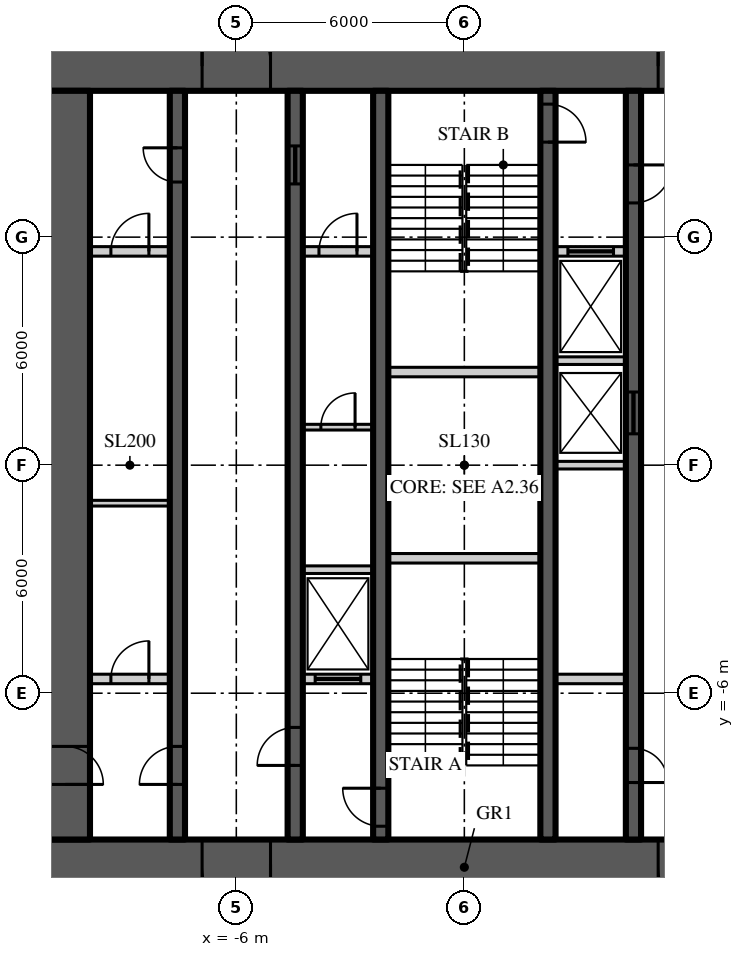
"""IFC4 building model, lengths in metres.
Left out: names, types, materials, properties, quantities, classifications, styles, units other than length and angle.
Written with IfcOpenShell. Run it as: python <this file> out.ifc"""

import sys

from ifc_helpers import new_model, si_unit, direction, frame, frame_2d, origin, place, context, subcontext, project, spatial, rectangle, extrude, element, fill, save


model = new_model("IFC4")
c1 = context("Model", 3, precision=1e-05, world=origin(), true_north=direction((0.0, 1.0)))
c2 = subcontext(c1, "Body", "Model", "MODEL_VIEW")
j1 = project(units=[si_unit("LENGTHUNIT", "METRE"), si_unit("PLANEANGLEUNIT", "RADIAN")], contexts=[c1])
p1 = place(None, origin())
s1 = spatial("IfcSite", under=j1, at=p1, CompositionType="ELEMENT")
p2 = place(p1, origin())
s2 = spatial("IfcBuilding", under=s1, at=p2, CompositionType="ELEMENT")
p3 = place(p2, frame((0.0, 0.0, 286.8)))
s3 = spatial("IfcBuildingStorey", under=s2, at=p3, CompositionType="ELEMENT", Elevation=286.8)
p4 = place(p3, frame((-11.15, 10.5, 0.0), z_axis=(0.0, 0.0, 1.0), x_axis=(1.0, 0.0, 0.0)))
e1 = element("IfcWall", 1, at=p4, inside=s3, PredefinedType="SHEAR", context=c2, shape_type="SweptSolid", body=[
    extrude(rectangle(XDim=22.3, YDim=1.3, at=frame_2d((11.15, 0.0))), origin(), (0.0, 0.0, 1.0), 3.9),
])
p5 = place(p4, frame((4.25, 0.0, 0.0)))
e2 = element("IfcOpeningElement", 2, at=p5, cuts=e1, PredefinedType="OPENING", context=c2, shape_type="SweptSolid", body=[
    extrude(rectangle(XDim=1.8, YDim=2.2, at=frame_2d((0.9, 1.1))), frame((0.0, 0.66, 0.0), z_axis=(0.0, -1.0, 0.0), x_axis=(1.0, 0.0, 0.0)), (0.0, 0.0, 1.0), 1.32),
])
p6 = place(p4, frame((16.25, 0.0, 0.0)))
e3 = element("IfcOpeningElement", 3, at=p6, cuts=e1, PredefinedType="OPENING", context=c2, shape_type="SweptSolid", body=[
    extrude(rectangle(XDim=1.8, YDim=2.2, at=frame_2d((0.9, 1.1))), frame((0.0, 0.66, 0.0), z_axis=(0.0, -1.0, 0.0), x_axis=(1.0, 0.0, 0.0)), (0.0, 0.0, 1.0), 1.32),
])
p7 = place(p3, frame((11.15, -10.5, 0.0), z_axis=(0.0, 0.0, 1.0), x_axis=(-1.0, 0.0, 0.0)))
e4 = element("IfcWall", 4, at=p7, inside=s3, PredefinedType="SHEAR", context=c2, shape_type="SweptSolid", body=[
    extrude(rectangle(XDim=22.3, YDim=1.3, at=frame_2d((11.15, 0.0))), origin(), (0.0, 0.0, 1.0), 3.9),
])
p8 = place(p7, frame((16.25, 0.0, 0.0)))
e5 = element("IfcOpeningElement", 5, at=p8, cuts=e4, PredefinedType="OPENING", context=c2, shape_type="SweptSolid", body=[
    extrude(rectangle(XDim=1.8, YDim=2.2, at=frame_2d((0.9, 1.1))), frame((0.0, 0.66, 0.0), z_axis=(0.0, -1.0, 0.0), x_axis=(1.0, 0.0, 0.0)), (0.0, 0.0, 1.0), 1.32),
])
p9 = place(p7, frame((4.25, 0.0, 0.0)))
e6 = element("IfcOpeningElement", 6, at=p9, cuts=e4, PredefinedType="OPENING", context=c2, shape_type="SweptSolid", body=[
    extrude(rectangle(XDim=1.8, YDim=2.2, at=frame_2d((0.9, 1.1))), frame((0.0, 0.66, 0.0), z_axis=(0.0, -1.0, 0.0), x_axis=(1.0, 0.0, 0.0)), (0.0, 0.0, 1.0), 1.32),
])
p10 = place(p3, frame((-10.5, 9.85, 0.0), z_axis=(0.0, 0.0, 1.0), x_axis=(0.0, -1.0, 0.0)))
e7 = element("IfcWall", 7, at=p10, inside=s3, PredefinedType="SHEAR", context=c2, shape_type="SweptSolid", body=[
    extrude(rectangle(XDim=19.7, YDim=1.3, at=frame_2d((9.85, 0.0))), origin(), (0.0, 0.0, 1.0), 3.9),
])
p11 = place(p10, frame((17.25, 0.0, 0.0)))
e8 = element("IfcOpeningElement", 8, at=p11, cuts=e7, PredefinedType="OPENING", context=c2, shape_type="SweptSolid", body=[
    extrude(rectangle(XDim=1.0, YDim=2.2, at=frame_2d((0.5, 1.1))), frame((0.0, 0.66, 0.0), z_axis=(0.0, -1.0, 0.0), x_axis=(1.0, 0.0, 0.0)), (0.0, 0.0, 1.0), 1.32),
])
p12 = place(p3, frame((-7.55, -9.85, 0.0), z_axis=(0.0, 0.0, 1.0), x_axis=(0.0, 1.0, 0.0)))
e9 = element("IfcWall", 9, at=p12, inside=s3, PredefinedType="SHEAR", context=c2, shape_type="SweptSolid", body=[
    extrude(rectangle(XDim=19.7, YDim=0.4, at=frame_2d((9.85, 0.0))), origin(), (0.0, 0.0, 1.0), 3.9),
])
p13 = place(p12, frame((1.45, 0.0, 0.0)))
e10 = element("IfcOpeningElement", 10, at=p13, cuts=e9, PredefinedType="OPENING", context=c2, shape_type="SweptSolid", body=[
    extrude(rectangle(XDim=1.0, YDim=2.2, at=frame_2d((0.5, 1.1))), frame((0.0, 0.21, 0.0), z_axis=(0.0, -1.0, 0.0), x_axis=(1.0, 0.0, 0.0)), (0.0, 0.0, 1.0), 0.42),
])
p14 = place(p12, frame((17.3, 0.0, 0.0)))
e11 = element("IfcOpeningElement", 11, at=p14, cuts=e9, PredefinedType="OPENING", context=c2, shape_type="SweptSolid", body=[
    extrude(rectangle(XDim=0.9, YDim=2.1, at=frame_2d((0.45, 1.05))), frame((0.0, 0.21, 0.0), z_axis=(0.0, -1.0, 0.0), x_axis=(1.0, 0.0, 0.0)), (0.0, 0.0, 1.0), 0.42),
])
p15 = place(p3, frame((-4.45, -9.85, 0.0), z_axis=(0.0, 0.0, 1.0), x_axis=(0.0, 1.0, 0.0)))
e12 = element("IfcWall", 12, at=p15, inside=s3, PredefinedType="SHEAR", context=c2, shape_type="SweptSolid", body=[
    extrude(rectangle(XDim=19.7, YDim=0.4, at=frame_2d((9.85, 0.0))), origin(), (0.0, 0.0, 1.0), 3.9),
])
p16 = place(p15, frame((1.95, 0.0, 0.0)))
e13 = element("IfcOpeningElement", 13, at=p16, cuts=e12, PredefinedType="OPENING", context=c2, shape_type="SweptSolid", body=[
    extrude(rectangle(XDim=1.0, YDim=2.2, at=frame_2d((0.5, 1.1))), frame((0.0, 0.21, 0.0), z_axis=(0.0, -1.0, 0.0), x_axis=(1.0, 0.0, 0.0)), (0.0, 0.0, 1.0), 0.42),
])
p17 = place(p15, frame((17.25, 0.0, 0.0)))
e14 = element("IfcOpeningElement", 14, at=p17, cuts=e12, PredefinedType="OPENING", context=c2, shape_type="SweptSolid", body=[
    extrude(rectangle(XDim=1.0, YDim=2.1, at=frame_2d((0.5, 1.05))), frame((0.0, 0.21, 0.0), z_axis=(0.0, -1.0, 0.0), x_axis=(1.0, 0.0, 0.0)), (0.0, 0.0, 1.0), 0.42),
])
p18 = place(p3, frame((4.45, 9.85, 0.0), z_axis=(0.0, 0.0, 1.0), x_axis=(0.0, -1.0, 0.0)))
e15 = element("IfcWall", 15, at=p18, inside=s3, PredefinedType="SHEAR", context=c2, shape_type="SweptSolid", body=[
    extrude(rectangle(XDim=19.7, YDim=0.4, at=frame_2d((9.85, 0.0))), origin(), (0.0, 0.0, 1.0), 3.9),
])
p19 = place(p18, frame((1.95, 0.0, 0.0)))
e16 = element("IfcOpeningElement", 16, at=p19, cuts=e15, PredefinedType="OPENING", context=c2, shape_type="SweptSolid", body=[
    extrude(rectangle(XDim=1.0, YDim=2.2, at=frame_2d((0.5, 1.1))), frame((0.0, 0.21, 0.0), z_axis=(0.0, -1.0, 0.0), x_axis=(1.0, 0.0, 0.0)), (0.0, 0.0, 1.0), 0.42),
])
p20 = place(p18, frame((17.3, 0.0, 0.0)))
e17 = element("IfcOpeningElement", 17, at=p20, cuts=e15, PredefinedType="OPENING", context=c2, shape_type="SweptSolid", body=[
    extrude(rectangle(XDim=0.9, YDim=2.1, at=frame_2d((0.45, 1.05))), frame((0.0, 0.21, 0.0), z_axis=(0.0, -1.0, 0.0), x_axis=(1.0, 0.0, 0.0)), (0.0, 0.0, 1.0), 0.42),
])
p21 = place(p18, frame((7.925, 0.0, 0.0)))
e18 = element("IfcOpeningElement", 18, at=p21, cuts=e15, PredefinedType="OPENING", context=c2, shape_type="SweptSolid", body=[
    extrude(rectangle(XDim=1.1, YDim=2.2, at=frame_2d((0.55, 1.1))), frame((0.0, 0.21, 0.0), z_axis=(0.0, -1.0, 0.0), x_axis=(1.0, 0.0, 0.0)), (0.0, 0.0, 1.0), 0.42),
])
p22 = place(p3, frame((-2.2, -9.85, 0.0), z_axis=(0.0, 0.0, 1.0), x_axis=(0.0, 1.0, 0.0)))
e19 = element("IfcWall", 19, at=p22, inside=s3, PredefinedType="SHEAR", context=c2, shape_type="SweptSolid", body=[
    extrude(rectangle(XDim=19.7, YDim=0.4, at=frame_2d((9.85, 0.0))), origin(), (0.0, 0.0, 1.0), 3.9),
])
p23 = place(p22, frame((0.35, 0.0, 0.0)))
e20 = element("IfcOpeningElement", 20, at=p23, cuts=e19, PredefinedType="OPENING", context=c2, shape_type="SweptSolid", body=[
    extrude(rectangle(XDim=1.0, YDim=2.2, at=frame_2d((0.5, 1.1))), frame((0.0, 0.21, 0.0), z_axis=(0.0, -1.0, 0.0), x_axis=(1.0, 0.0, 0.0)), (0.0, 0.0, 1.0), 0.42),
])
p24 = place(p3, frame((2.2, 9.85, 0.0), z_axis=(0.0, 0.0, 1.0), x_axis=(0.0, -1.0, 0.0)))
e21 = element("IfcWall", 21, at=p24, inside=s3, PredefinedType="SHEAR", context=c2, shape_type="SweptSolid", body=[
    extrude(rectangle(XDim=19.7, YDim=0.4, at=frame_2d((9.85, 0.0))), origin(), (0.0, 0.0, 1.0), 3.9),
])
p25 = place(p24, frame((0.35, 0.0, 0.0)))
e22 = element("IfcOpeningElement", 22, at=p25, cuts=e21, PredefinedType="OPENING", context=c2, shape_type="SweptSolid", body=[
    extrude(rectangle(XDim=1.0, YDim=2.2, at=frame_2d((0.5, 1.1))), frame((0.0, 0.21, 0.0), z_axis=(0.0, -1.0, 0.0), x_axis=(1.0, 0.0, 0.0)), (0.0, 0.0, 1.0), 0.42),
])
p26 = place(p3, frame((-9.85, 5.625, 0.0), z_axis=(0.0, 0.0, 1.0), x_axis=(1.0, 0.0, 0.0)))
e23 = element("IfcWall", 23, at=p26, inside=s3, PredefinedType="SOLIDWALL", context=c2, shape_type="SweptSolid", body=[
    extrude(rectangle(XDim=2.1, YDim=0.25, at=frame_2d((1.05, 0.0))), origin(), (0.0, 0.0, 1.0), 3.7),
])
p27 = place(p26, frame((0.55, 0.0, 0.0)))
e24 = element("IfcOpeningElement", 24, at=p27, cuts=e23, PredefinedType="OPENING", context=c2, shape_type="SweptSolid", body=[
    extrude(rectangle(XDim=1.0, YDim=2.2, at=frame_2d((0.5, 1.1))), frame((0.0, 0.135, 0.0), z_axis=(0.0, -1.0, 0.0), x_axis=(1.0, 0.0, 0.0)), (0.0, 0.0, 1.0), 0.27),
])
p28 = place(p3, frame((-4.25, 5.625, 0.0), z_axis=(0.0, 0.0, 1.0), x_axis=(1.0, 0.0, 0.0)))
e25 = element("IfcWall", 25, at=p28, inside=s3, PredefinedType="SOLIDWALL", context=c2, shape_type="SweptSolid", body=[
    extrude(rectangle(XDim=1.85, YDim=0.25, at=frame_2d((0.925, 0.0))), origin(), (0.0, 0.0, 1.0), 3.7),
])
p29 = place(p28, frame((0.425, 0.0, 0.0)))
e26 = element("IfcOpeningElement", 26, at=p29, cuts=e25, PredefinedType="OPENING", context=c2, shape_type="SweptSolid", body=[
    extrude(rectangle(XDim=1.0, YDim=2.2, at=frame_2d((0.5, 1.1))), frame((0.0, 0.135, 0.0), z_axis=(0.0, -1.0, 0.0), x_axis=(1.0, 0.0, 0.0)), (0.0, 0.0, 1.0), 0.27),
])
p30 = place(p3, frame((2.4, 5.625, 0.0), z_axis=(0.0, 0.0, 1.0), x_axis=(1.0, 0.0, 0.0)))
e27 = element("IfcWall", 27, at=p30, inside=s3, PredefinedType="SOLIDWALL", context=c2, shape_type="SweptSolid", body=[
    extrude(rectangle(XDim=1.85, YDim=0.25, at=frame_2d((0.925, 0.0))), origin(), (0.0, 0.0, 1.0), 3.7),
])
p31 = place(p30, frame((0.325, 0.0, 0.0)))
e28 = element("IfcOpeningElement", 28, at=p31, cuts=e27, PredefinedType="OPENING", context=c2, shape_type="SweptSolid", body=[
    extrude(rectangle(XDim=1.2, YDim=2.2, at=frame_2d((0.6, 1.1))), frame((0.0, 0.135, 0.0), z_axis=(0.0, -1.0, 0.0), x_axis=(1.0, 0.0, 0.0)), (0.0, 0.0, 1.0), 0.27),
])
p32 = place(p3, frame((-9.85, -5.625, 0.0), z_axis=(0.0, 0.0, 1.0), x_axis=(1.0, 0.0, 0.0)))
e29 = element("IfcWall", 29, at=p32, inside=s3, PredefinedType="SOLIDWALL", context=c2, shape_type="SweptSolid", body=[
    extrude(rectangle(XDim=2.1, YDim=0.25, at=frame_2d((1.05, 0.0))), origin(), (0.0, 0.0, 1.0), 3.7),
])
p33 = place(p32, frame((0.55, 0.0, 0.0)))
e30 = element("IfcOpeningElement", 30, at=p33, cuts=e29, PredefinedType="OPENING", context=c2, shape_type="SweptSolid", body=[
    extrude(rectangle(XDim=1.0, YDim=2.2, at=frame_2d((0.5, 1.1))), frame((0.0, 0.135, 0.0), z_axis=(0.0, -1.0, 0.0), x_axis=(1.0, 0.0, 0.0)), (0.0, 0.0, 1.0), 0.27),
])
p34 = place(p3, frame((-4.25, -5.625, 0.0), z_axis=(0.0, 0.0, 1.0), x_axis=(1.0, 0.0, 0.0)))
e31 = element("IfcWall", 31, at=p34, inside=s3, PredefinedType="SOLIDWALL", context=c2, shape_type="SweptSolid", body=[
    extrude(rectangle(XDim=1.85, YDim=0.25, at=frame_2d((0.925, 0.0))), origin(), (0.0, 0.0, 1.0), 3.7),
])
p35 = place(p34, frame((0.325, 0.0, 0.0)))
e32 = element("IfcOpeningElement", 32, at=p35, cuts=e31, PredefinedType="OPENING", context=c2, shape_type="SweptSolid", body=[
    extrude(rectangle(XDim=1.2, YDim=2.2, at=frame_2d((0.6, 1.1))), frame((0.0, 0.135, 0.0), z_axis=(0.0, -1.0, 0.0), x_axis=(1.0, 0.0, 0.0)), (0.0, 0.0, 1.0), 0.27),
])
p36 = place(p3, frame((2.4, -5.625, 0.0), z_axis=(0.0, 0.0, 1.0), x_axis=(1.0, 0.0, 0.0)))
e33 = element("IfcWall", 33, at=p36, inside=s3, PredefinedType="SOLIDWALL", context=c2, shape_type="SweptSolid", body=[
    extrude(rectangle(XDim=1.85, YDim=0.25, at=frame_2d((0.925, 0.0))), origin(), (0.0, 0.0, 1.0), 3.7),
])
for number, where, z_axis, x_axis in (
    (34, (-2.0, -2.45, 0.0), (0.0, 0.0, 1.0), (1.0, 0.0, 0.0)),
    (35, (-2.0, 2.45, 0.0), (0.0, 0.0, 1.0), (1.0, 0.0, 0.0)),
):
    element("IfcWall", number, at=place(p3, frame(where, z_axis=z_axis, x_axis=x_axis)), inside=s3, PredefinedType="SOLIDWALL", context=c2, shape_type="SweptSolid", body=[
        extrude(rectangle(XDim=4.0, YDim=0.25, at=frame_2d((2.0, 0.0))), origin(), (0.0, 0.0, 1.0), 3.7),
    ])
for number, where, z_axis, x_axis in (
    (36, (-4.25, -2.75, 0.0), (0.0, 0.0, 1.0), (1.0, 0.0, 0.0)),
    (37, (2.4, 0.0, 0.0), (0.0, 0.0, 1.0), (1.0, 0.0, 0.0)),
    (38, (2.4, 2.75, 0.0), (0.0, 0.0, 1.0), (1.0, 0.0, 0.0)),
):
    element("IfcWall", number, at=place(p3, frame(where, z_axis=z_axis, x_axis=x_axis)), inside=s3, PredefinedType="SOLIDWALL", context=c2, shape_type="SweptSolid", body=[
        extrude(rectangle(XDim=1.85, YDim=0.2, at=frame_2d((0.925, 0.0))), origin(), (0.0, 0.0, 1.0), 3.7),
    ])
p37 = place(p3, frame((-9.85, -1.0, 0.0), z_axis=(0.0, 0.0, 1.0), x_axis=(1.0, 0.0, 0.0)))
e39 = element("IfcWall", 39, at=p37, inside=s3, PredefinedType="SOLIDWALL", context=c2, shape_type="SweptSolid", body=[
    extrude(rectangle(XDim=2.1, YDim=0.15, at=frame_2d((1.05, 0.0))), origin(), (0.0, 0.0, 1.0), 3.77),
])
p38 = place(p3, frame((-4.25, 1.0, 0.0), z_axis=(0.0, 0.0, 1.0), x_axis=(1.0, 0.0, 0.0)))
e40 = element("IfcWall", 40, at=p38, inside=s3, PredefinedType="SOLIDWALL", context=c2, shape_type="SweptSolid", body=[
    extrude(rectangle(XDim=1.85, YDim=0.15, at=frame_2d((0.925, 0.0))), origin(), (0.0, 0.0, 1.0), 3.77),
])
p39 = place(p38, frame((0.475, 0.0, 0.0)))
e41 = element("IfcOpeningElement", 41, at=p39, cuts=e40, PredefinedType="OPENING", context=c2, shape_type="SweptSolid", body=[
    extrude(rectangle(XDim=0.9, YDim=2.1, at=frame_2d((0.45, 1.05))), frame((0.0, 0.085, 0.0), z_axis=(0.0, -1.0, 0.0), x_axis=(1.0, 0.0, 0.0)), (0.0, 0.0, 1.0), 0.17),
])
p40 = place(p5, origin())
e42 = element("IfcDoor", 42, at=p40, inside=s3, OperationType="DOUBLE_DOOR_DOUBLE_SWING", PredefinedType="DOOR", context=c2, shape_type="SweptSolid", body=[
    extrude(rectangle(XDim=1.8, YDim=2.2, at=frame_2d((0.9, 1.1))), frame((0.0, 0.025, 0.0), z_axis=(0.0, -1.0, 0.0), x_axis=(1.0, 0.0, 0.0)), (0.0, 0.0, 1.0), 0.05),
])
fill(e2, e42)
p41 = place(p8, origin())
e43 = element("IfcDoor", 43, at=p41, inside=s3, OperationType="DOUBLE_DOOR_DOUBLE_SWING", PredefinedType="DOOR", context=c2, shape_type="SweptSolid", body=[
    extrude(rectangle(XDim=1.8, YDim=2.2, at=frame_2d((0.9, 1.1))), frame((0.0, 0.025, 0.0), z_axis=(0.0, -1.0, 0.0), x_axis=(1.0, 0.0, 0.0)), (0.0, 0.0, 1.0), 0.05),
])
fill(e5, e43)
p42 = place(p6, origin())
e44 = element("IfcDoor", 44, at=p42, inside=s3, OperationType="DOUBLE_DOOR_DOUBLE_SWING", PredefinedType="DOOR", context=c2, shape_type="SweptSolid", body=[
    extrude(rectangle(XDim=1.8, YDim=2.2, at=frame_2d((0.9, 1.1))), frame((0.0, 0.025, 0.0), z_axis=(0.0, -1.0, 0.0), x_axis=(1.0, 0.0, 0.0)), (0.0, 0.0, 1.0), 0.05),
])
fill(e3, e44)
p43 = place(p9, origin())
e45 = element("IfcDoor", 45, at=p43, inside=s3, OperationType="DOUBLE_DOOR_DOUBLE_SWING", PredefinedType="DOOR", context=c2, shape_type="SweptSolid", body=[
    extrude(rectangle(XDim=1.8, YDim=2.2, at=frame_2d((0.9, 1.1))), frame((0.0, 0.025, 0.0), z_axis=(0.0, -1.0, 0.0), x_axis=(1.0, 0.0, 0.0)), (0.0, 0.0, 1.0), 0.05),
])
fill(e6, e45)
p44 = place(p13, origin())
e46 = element("IfcDoor", 46, at=p44, inside=s3, OperationType="SINGLE_SWING_LEFT", PredefinedType="DOOR", context=c2, shape_type="SweptSolid", body=[
    extrude(rectangle(XDim=1.0, YDim=2.2, at=frame_2d((0.5, 1.1))), frame((0.0, 0.025, 0.0), z_axis=(0.0, -1.0, 0.0), x_axis=(1.0, 0.0, 0.0)), (0.0, 0.0, 1.0), 0.05),
])
fill(e10, e46)
p45 = place(p11, origin())
e47 = element("IfcDoor", 47, at=p45, inside=s3, OperationType="SINGLE_SWING_RIGHT", PredefinedType="DOOR", context=c2, shape_type="SweptSolid", body=[
    extrude(rectangle(XDim=1.0, YDim=2.2, at=frame_2d((0.5, 1.1))), frame((0.0, 0.025, 0.0), z_axis=(0.0, -1.0, 0.0), x_axis=(1.0, 0.0, 0.0)), (0.0, 0.0, 1.0), 0.05),
])
fill(e8, e47)
p46 = place(p16, origin())
e48 = element("IfcDoor", 48, at=p46, inside=s3, OperationType="SINGLE_SWING_LEFT", PredefinedType="DOOR", context=c2, shape_type="SweptSolid", body=[
    extrude(rectangle(XDim=1.0, YDim=2.2, at=frame_2d((0.5, 1.1))), frame((0.0, 0.025, 0.0), z_axis=(0.0, -1.0, 0.0), x_axis=(1.0, 0.0, 0.0)), (0.0, 0.0, 1.0), 0.05),
])
fill(e13, e48)
p47 = place(p23, origin())
e49 = element("IfcDoor", 49, at=p47, inside=s3, OperationType="SINGLE_SWING_RIGHT", PredefinedType="DOOR", context=c2, shape_type="SweptSolid", body=[
    extrude(rectangle(XDim=1.0, YDim=2.2, at=frame_2d((0.5, 1.1))), frame((0.0, 0.025, 0.0), z_axis=(0.0, -1.0, 0.0), x_axis=(1.0, 0.0, 0.0)), (0.0, 0.0, 1.0), 0.05),
])
fill(e20, e49)
p48 = place(p19, origin())
e50 = element("IfcDoor", 50, at=p48, inside=s3, OperationType="SINGLE_SWING_LEFT", PredefinedType="DOOR", context=c2, shape_type="SweptSolid", body=[
    extrude(rectangle(XDim=1.0, YDim=2.2, at=frame_2d((0.5, 1.1))), frame((0.0, 0.025, 0.0), z_axis=(0.0, -1.0, 0.0), x_axis=(1.0, 0.0, 0.0)), (0.0, 0.0, 1.0), 0.05),
])
fill(e16, e50)
p49 = place(p25, origin())
e51 = element("IfcDoor", 51, at=p49, inside=s3, OperationType="SINGLE_SWING_RIGHT", PredefinedType="DOOR", context=c2, shape_type="SweptSolid", body=[
    extrude(rectangle(XDim=1.0, YDim=2.2, at=frame_2d((0.5, 1.1))), frame((0.0, 0.025, 0.0), z_axis=(0.0, -1.0, 0.0), x_axis=(1.0, 0.0, 0.0)), (0.0, 0.0, 1.0), 0.05),
])
fill(e22, e51)
p50 = place(p14, origin())
e52 = element("IfcDoor", 52, at=p50, inside=s3, OperationType="SINGLE_SWING_RIGHT", PredefinedType="DOOR", context=c2, shape_type="SweptSolid", body=[
    extrude(rectangle(XDim=0.9, YDim=2.1, at=frame_2d((0.45, 1.05))), frame((0.0, 0.025, 0.0), z_axis=(0.0, -1.0, 0.0), x_axis=(1.0, 0.0, 0.0)), (0.0, 0.0, 1.0), 0.05),
])
fill(e11, e52)
p51 = place(p17, origin())
e53 = element("IfcDoor", 53, at=p51, inside=s3, OperationType="SLIDING_TO_LEFT", PredefinedType="DOOR", context=c2, shape_type="SweptSolid", body=[
    extrude(rectangle(XDim=1.0, YDim=2.1, at=frame_2d((0.5, 1.05))), frame((0.0, 0.025, 0.0), z_axis=(0.0, -1.0, 0.0), x_axis=(1.0, 0.0, 0.0)), (0.0, 0.0, 1.0), 0.05),
])
fill(e14, e53)
p52 = place(p20, origin())
e54 = element("IfcDoor", 54, at=p52, inside=s3, OperationType="SINGLE_SWING_RIGHT", PredefinedType="DOOR", context=c2, shape_type="SweptSolid", body=[
    extrude(rectangle(XDim=0.9, YDim=2.1, at=frame_2d((0.45, 1.05))), frame((0.0, 0.025, 0.0), z_axis=(0.0, -1.0, 0.0), x_axis=(1.0, 0.0, 0.0)), (0.0, 0.0, 1.0), 0.05),
])
fill(e17, e54)
p53 = place(p21, origin())
e55 = element("IfcDoor", 55, at=p53, inside=s3, OperationType="SLIDING_TO_LEFT", PredefinedType="DOOR", context=c2, shape_type="SweptSolid", body=[
    extrude(rectangle(XDim=1.1, YDim=2.2, at=frame_2d((0.55, 1.1))), frame((0.0, 0.025, 0.0), z_axis=(0.0, -1.0, 0.0), x_axis=(1.0, 0.0, 0.0)), (0.0, 0.0, 1.0), 0.05),
])
fill(e18, e55)
p54 = place(p35, origin())
e56 = element("IfcDoor", 56, at=p54, inside=s3, OperationType="SLIDING_TO_LEFT", PredefinedType="DOOR", context=c2, shape_type="SweptSolid", body=[
    extrude(rectangle(XDim=1.2, YDim=2.2, at=frame_2d((0.6, 1.1))), frame((0.0, 0.025, 0.0), z_axis=(0.0, -1.0, 0.0), x_axis=(1.0, 0.0, 0.0)), (0.0, 0.0, 1.0), 0.05),
])
fill(e32, e56)
p55 = place(p31, origin())
e57 = element("IfcDoor", 57, at=p55, inside=s3, OperationType="SLIDING_TO_LEFT", PredefinedType="DOOR", context=c2, shape_type="SweptSolid", body=[
    extrude(rectangle(XDim=1.2, YDim=2.2, at=frame_2d((0.6, 1.1))), frame((0.0, 0.025, 0.0), z_axis=(0.0, -1.0, 0.0), x_axis=(1.0, 0.0, 0.0)), (0.0, 0.0, 1.0), 0.05),
])
fill(e28, e57)
p56 = place(p27, origin())
e58 = element("IfcDoor", 58, at=p56, inside=s3, OperationType="SINGLE_SWING_RIGHT", PredefinedType="DOOR", context=c2, shape_type="SweptSolid", body=[
    extrude(rectangle(XDim=1.0, YDim=2.2, at=frame_2d((0.5, 1.1))), frame((0.0, 0.025, 0.0), z_axis=(0.0, -1.0, 0.0), x_axis=(1.0, 0.0, 0.0)), (0.0, 0.0, 1.0), 0.05),
])
fill(e24, e58)
p57 = place(p33, origin())
e59 = element("IfcDoor", 59, at=p57, inside=s3, OperationType="SINGLE_SWING_RIGHT", PredefinedType="DOOR", context=c2, shape_type="SweptSolid", body=[
    extrude(rectangle(XDim=1.0, YDim=2.2, at=frame_2d((0.5, 1.1))), frame((0.0, 0.025, 0.0), z_axis=(0.0, -1.0, 0.0), x_axis=(1.0, 0.0, 0.0)), (0.0, 0.0, 1.0), 0.05),
])
fill(e30, e59)
p58 = place(p39, origin())
e60 = element("IfcDoor", 60, at=p58, inside=s3, OperationType="SINGLE_SWING_RIGHT", PredefinedType="DOOR", context=c2, shape_type="SweptSolid", body=[
    extrude(rectangle(XDim=0.9, YDim=2.1, at=frame_2d((0.45, 1.05))), frame((0.0, 0.025, 0.0), z_axis=(0.0, -1.0, 0.0), x_axis=(1.0, 0.0, 0.0)), (0.0, 0.0, 1.0), 0.05),
])
fill(e41, e60)
p59 = place(p29, origin())
e61 = element("IfcDoor", 61, at=p59, inside=s3, OperationType="SINGLE_SWING_RIGHT", PredefinedType="DOOR", context=c2, shape_type="SweptSolid", body=[
    extrude(rectangle(XDim=1.0, YDim=2.2, at=frame_2d((0.5, 1.1))), frame((0.0, 0.025, 0.0), z_axis=(0.0, -1.0, 0.0), x_axis=(1.0, 0.0, 0.0)), (0.0, 0.0, 1.0), 0.05),
])
fill(e26, e61)
save(model, sys.argv[1])
